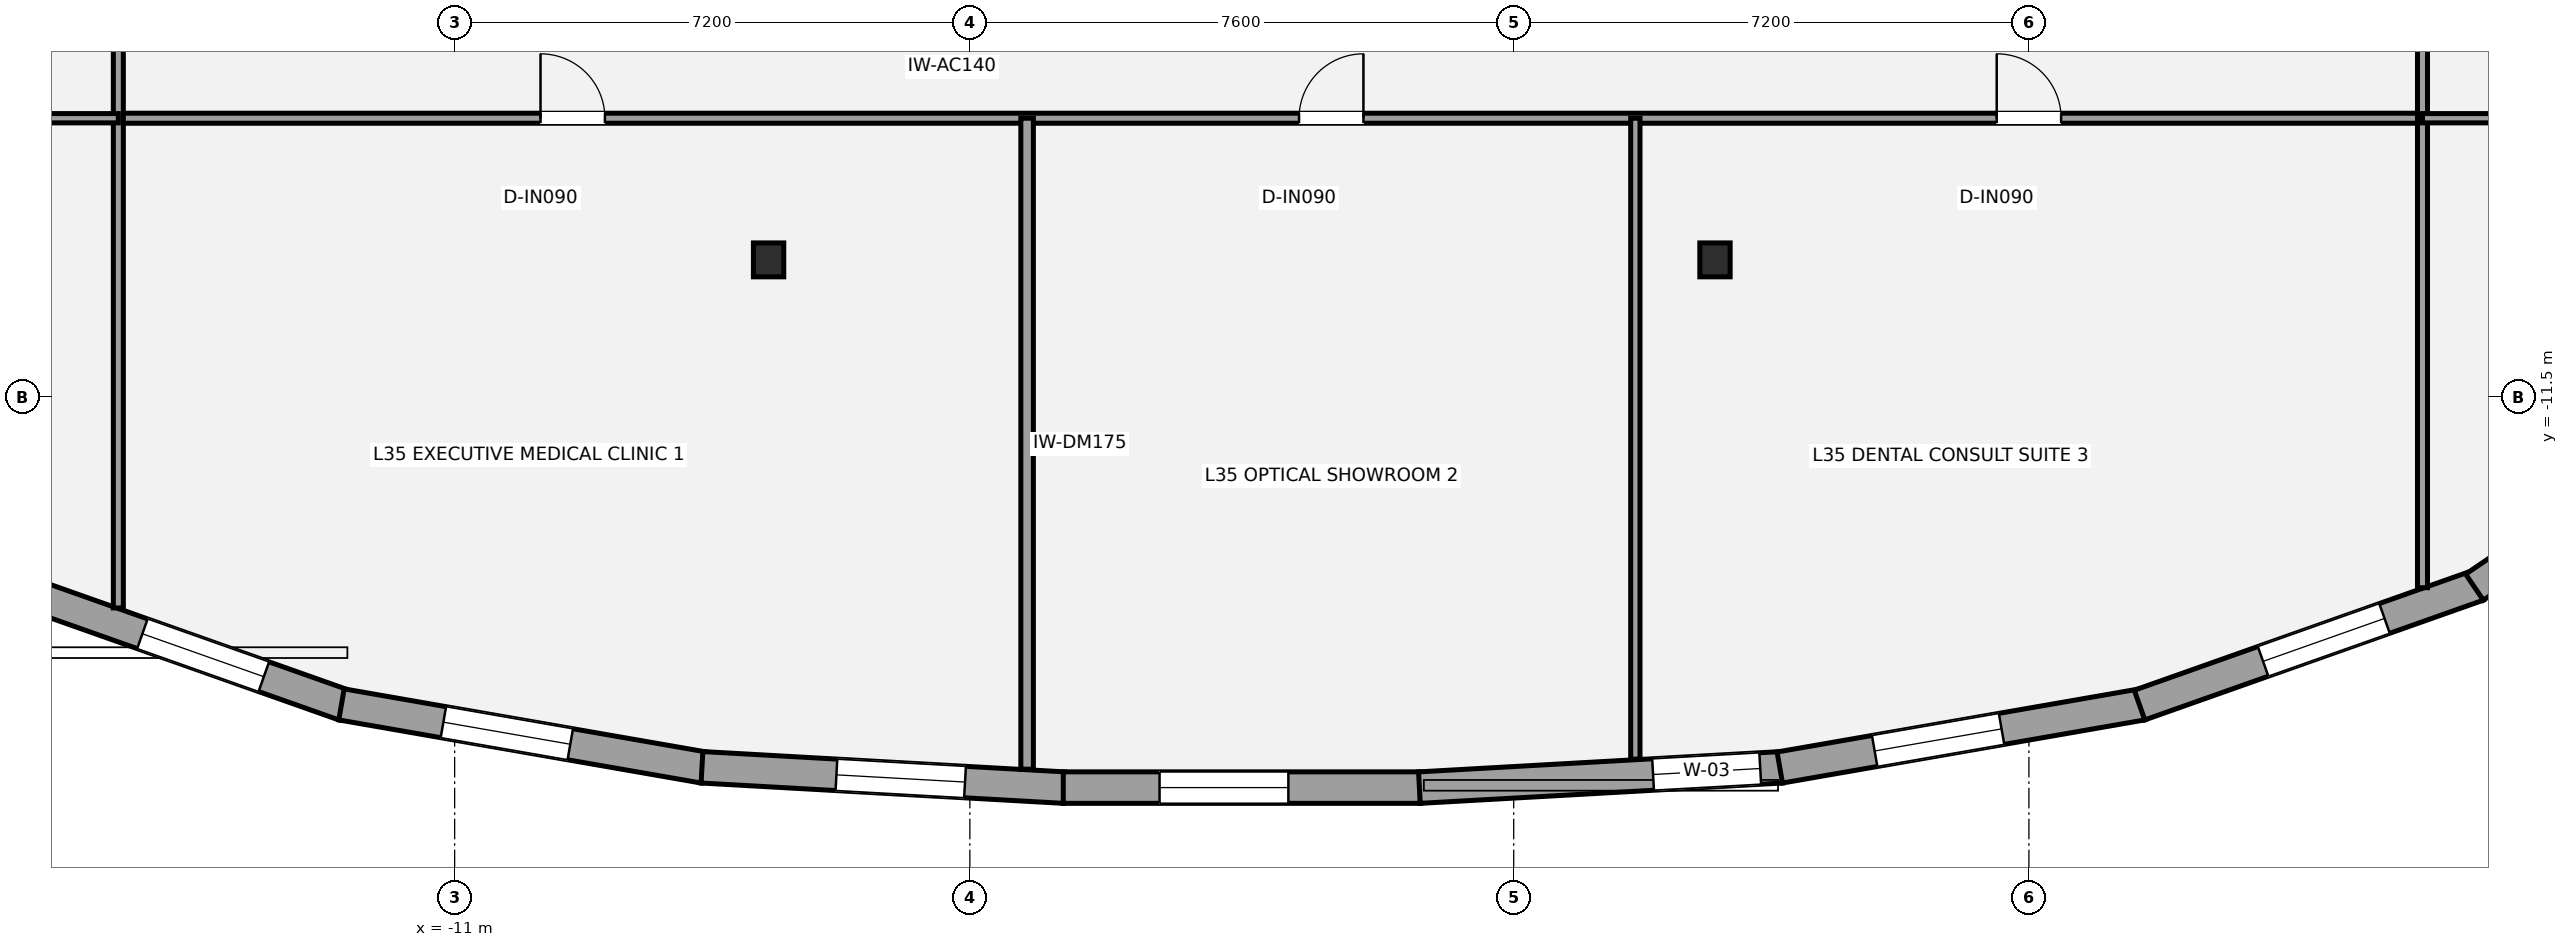
"""IFC4 building model, lengths in metres.
Left out: names, types, materials, properties, quantities, classifications, styles, units other than length and angle.
Written with IfcOpenShell. Run it as: python <this file> out.ifc"""

import sys

from ifc_helpers import new_model, si_unit, direction, frame, frame_2d, origin, origin_2d, place, context, subcontext, project, spatial, rectangle, i_section, extrude, element, fill, save


model = new_model("IFC4")
c1 = context("Model", 3, precision=1e-05, world=origin(), true_north=direction((0.0, 1.0)))
c2 = subcontext(c1, "Body", "Model", "MODEL_VIEW")
j1 = project(units=[si_unit("LENGTHUNIT", "METRE"), si_unit("PLANEANGLEUNIT", "RADIAN")], contexts=[c1])
p1 = place(None, origin())
s1 = spatial("IfcSite", under=j1, at=p1, CompositionType="ELEMENT")
p2 = place(p1, origin())
s2 = spatial("IfcBuilding", under=s1, at=p2, CompositionType="ELEMENT")
p3 = place(p2, frame((0.0, 0.0, 131.6)))
s3 = spatial("IfcBuildingStorey", under=s2, at=p3, CompositionType="ELEMENT", Elevation=131.6)
for number, where, z_axis, x_axis in (
    (1, (-6.613, -9.579, 0.0), (0.0, 0.0, 1.0), (1.0, 0.0, 0.0)),
    (2, (6.613, -9.579, 0.0), (0.0, 0.0, 1.0), (1.0, 0.0, 0.0)),
):
    element("IfcColumn", number, at=place(p3, frame(where, z_axis=z_axis, x_axis=x_axis)), inside=s3, PredefinedType="COLUMN", context=c2, shape_type="SweptSolid", body=[
        extrude(i_section(OverallWidth=0.424, OverallDepth=0.474, WebThickness=0.048, FlangeThickness=0.077, at=origin_2d()), origin(), (0.0, 0.0, 1.0), 3.5),
    ])
p4 = place(p3, frame((-12.546, -15.8, 0.0), z_axis=(0.0, 0.0, 1.0), x_axis=(-0.942780868171, 0.333413009061, 0.0)))
e3 = element("IfcWall", 3, at=p4, inside=s3, PredefinedType="STANDARD", context=c2, shape_type="SweptSolid", body=[
    extrude(rectangle(XDim=5.018, YDim=0.44, at=frame_2d((2.509, 0.0))), origin(), (0.0, 0.0, 1.0), 2.478),
])
p5 = place(p4, frame((1.189, 0.0, 0.65)))
e4 = element("IfcOpeningElement", 4, at=p5, cuts=e3, PredefinedType="OPENING", context=c2, shape_type="SweptSolid", body=[
    extrude(rectangle(XDim=1.8, YDim=1.7, at=frame_2d((0.9, 0.85))), frame((0.0, 0.23, 0.0), z_axis=(0.0, -1.0, 0.0), x_axis=(1.0, 0.0, 0.0)), (0.0, 0.0, 1.0), 0.46),
])
p6 = place(p3, frame((-7.518, -16.673, 0.0), z_axis=(0.0, 0.0, 1.0), x_axis=(-0.985177916526, 0.171535631254, 0.0)))
e5 = element("IfcWall", 5, at=p6, inside=s3, PredefinedType="STANDARD", context=c2, shape_type="SweptSolid", body=[
    extrude(rectangle(XDim=5.139, YDim=0.44, at=frame_2d((2.57, 0.0))), origin(), (0.0, 0.0, 1.0), 2.478),
])
p7 = place(p6, frame((1.894, 0.0, 0.65)))
e6 = element("IfcOpeningElement", 6, at=p7, cuts=e5, PredefinedType="OPENING", context=c2, shape_type="SweptSolid", body=[
    extrude(rectangle(XDim=1.8, YDim=1.7, at=frame_2d((0.9, 0.85))), frame((0.0, 0.23, 0.0), z_axis=(0.0, -1.0, 0.0), x_axis=(1.0, 0.0, 0.0)), (0.0, 0.0, 1.0), 0.46),
])
p8 = place(p3, frame((-2.482, -16.954, 0.0), z_axis=(0.0, 0.0, 1.0), x_axis=(-0.99842742965, 0.056059501621, 0.0)))
e7 = element("IfcWall", 7, at=p8, inside=s3, PredefinedType="STANDARD", context=c2, shape_type="SweptSolid", body=[
    extrude(rectangle(XDim=5.069, YDim=0.44, at=frame_2d((2.535, 0.0))), origin(), (0.0, 0.0, 1.0), 2.478),
])
p9 = place(p8, frame((1.387, 0.0, 0.65)))
e8 = element("IfcOpeningElement", 8, at=p9, cuts=e7, PredefinedType="OPENING", context=c2, shape_type="SweptSolid", body=[
    extrude(rectangle(XDim=1.8, YDim=1.7, at=frame_2d((0.9, 0.85))), frame((0.0, 0.23, 0.0), z_axis=(0.0, -1.0, 0.0), x_axis=(1.0, 0.0, 0.0)), (0.0, 0.0, 1.0), 0.46),
])
p10 = place(p3, frame((2.495, -16.953, 0.0), z_axis=(0.0, 0.0, 1.0), x_axis=(-1.0, 0.0, 0.0)))
e9 = element("IfcWall", 9, at=p10, inside=s3, PredefinedType="STANDARD", context=c2, shape_type="SweptSolid", body=[
    extrude(rectangle(XDim=4.989, YDim=0.44, at=frame_2d((2.495, 0.0))), origin(), (0.0, 0.0, 1.0), 2.482),
])
p11 = place(p10, frame((1.844, 0.0, 0.65)))
e10 = element("IfcOpeningElement", 10, at=p11, cuts=e9, PredefinedType="OPENING", context=c2, shape_type="SweptSolid", body=[
    extrude(rectangle(XDim=1.8, YDim=1.7, at=frame_2d((0.9, 0.85))), frame((0.0, 0.23, 0.0), z_axis=(0.0, -1.0, 0.0), x_axis=(1.0, 0.0, 0.0)), (0.0, 0.0, 1.0), 0.46),
])
p12 = place(p3, frame((7.544, -16.669, 0.0), z_axis=(0.0, 0.0, 1.0), x_axis=(-0.99842742965, -0.056059501621, 0.0)))
e11 = element("IfcWall", 11, at=p12, inside=s3, PredefinedType="STANDARD", context=c2, shape_type="SweptSolid", body=[
    extrude(rectangle(XDim=5.069, YDim=0.44, at=frame_2d((2.535, 0.0))), origin(), (0.0, 0.0, 1.0), 2.478),
])
p13 = place(p12, frame((0.299, 0.0, 0.65)))
e12 = element("IfcOpeningElement", 12, at=p13, cuts=e11, PredefinedType="OPENING", context=c2, shape_type="SweptSolid", body=[
    extrude(rectangle(XDim=1.5, YDim=1.7, at=frame_2d((0.75, 0.85))), frame((0.0, 0.23, 0.0), z_axis=(0.0, -1.0, 0.0), x_axis=(1.0, 0.0, 0.0)), (0.0, 0.0, 1.0), 0.46),
])
p14 = place(p3, frame((12.582, -15.791, 0.0), z_axis=(0.0, 0.0, 1.0), x_axis=(-0.985177916526, -0.171535631254, 0.0)))
e13 = element("IfcWall", 13, at=p14, inside=s3, PredefinedType="STANDARD", context=c2, shape_type="SweptSolid", body=[
    extrude(rectangle(XDim=5.139, YDim=0.44, at=frame_2d((2.57, 0.0))), origin(), (0.0, 0.0, 1.0), 2.478),
])
p15 = place(p14, frame((1.993, 0.0, 0.65)))
e14 = element("IfcOpeningElement", 14, at=p15, cuts=e13, PredefinedType="OPENING", context=c2, shape_type="SweptSolid", body=[
    extrude(rectangle(XDim=1.8, YDim=1.7, at=frame_2d((0.9, 0.85))), frame((0.0, 0.23, 0.0), z_axis=(0.0, -1.0, 0.0), x_axis=(1.0, 0.0, 0.0)), (0.0, 0.0, 1.0), 0.46),
])
p16 = place(p3, frame((17.277, -14.127, 0.0), z_axis=(0.0, 0.0, 1.0), x_axis=(-0.942780868171, -0.333413009061, 0.0)))
e15 = element("IfcWall", 15, at=p16, inside=s3, PredefinedType="STANDARD", context=c2, shape_type="SweptSolid", body=[
    extrude(rectangle(XDim=5.018, YDim=0.44, at=frame_2d((2.509, 0.0))), origin(), (0.0, 0.0, 1.0), 2.478),
])
p17 = place(p16, frame((1.387, 0.0, 0.65)))
e16 = element("IfcOpeningElement", 16, at=p17, cuts=e15, PredefinedType="OPENING", context=c2, shape_type="SweptSolid", body=[
    extrude(rectangle(XDim=1.8, YDim=1.7, at=frame_2d((0.9, 0.85))), frame((0.0, 0.23, 0.0), z_axis=(0.0, -1.0, 0.0), x_axis=(1.0, 0.0, 0.0)), (0.0, 0.0, 1.0), 0.46),
])
p18 = place(p3, frame((21.018, -11.582, 0.0), z_axis=(0.0, 0.0, 1.0), x_axis=(-0.827670311179, -0.561214625605, 0.0)))
e17 = element("IfcWall", 17, at=p18, inside=s3, PredefinedType="STANDARD", context=c2, shape_type="SweptSolid", body=[
    extrude(rectangle(XDim=4.58, YDim=0.44, at=frame_2d((2.29, 0.0))), origin(), (0.0, 0.0, 1.0), 2.482),
])
p19 = place(p18, frame((1.886, 0.0, 0.65)))
e18 = element("IfcOpeningElement", 18, at=p19, cuts=e17, PredefinedType="OPENING", context=c2, shape_type="SweptSolid", body=[
    extrude(rectangle(XDim=1.8, YDim=1.7, at=frame_2d((0.9, 0.85))), frame((0.0, 0.23, 0.0), z_axis=(0.0, -1.0, 0.0), x_axis=(1.0, 0.0, 0.0)), (0.0, 0.0, 1.0), 0.46),
])
p20 = place(p3, frame((-15.7, -7.6, 0.0), z_axis=(0.0, 0.0, 1.0), x_axis=(1.0, 0.0, 0.0)))
e19 = element("IfcWall", 19, at=p20, inside=s3, PredefinedType="PARTITIONING", context=c2, shape_type="SweptSolid", body=[
    extrude(rectangle(XDim=32.2, YDim=0.14, at=frame_2d((16.1, 0.0))), origin(), (0.0, 0.0, 1.0), 2.638),
])
p21 = place(p20, frame((5.9, 0.0, 0.0)))
e20 = element("IfcOpeningElement", 20, at=p21, cuts=e19, PredefinedType="OPENING", context=c2, shape_type="SweptSolid", body=[
    extrude(rectangle(XDim=0.9, YDim=2.1, at=frame_2d((0.45, 1.05))), frame((0.0, 0.08, 0.0), z_axis=(0.0, -1.0, 0.0), x_axis=(1.0, 0.0, 0.0)), (0.0, 0.0, 1.0), 0.16),
])
p22 = place(p20, frame((16.5, 0.0, 0.0)))
e21 = element("IfcOpeningElement", 21, at=p22, cuts=e19, PredefinedType="OPENING", context=c2, shape_type="SweptSolid", body=[
    extrude(rectangle(XDim=0.9, YDim=2.1, at=frame_2d((0.45, 1.05))), frame((0.0, 0.08, 0.0), z_axis=(0.0, -1.0, 0.0), x_axis=(1.0, 0.0, 0.0)), (0.0, 0.0, 1.0), 0.16),
])
p23 = place(p20, frame((26.25, 0.0, 0.0)))
e22 = element("IfcOpeningElement", 22, at=p23, cuts=e19, PredefinedType="OPENING", context=c2, shape_type="SweptSolid", body=[
    extrude(rectangle(XDim=0.9, YDim=2.1, at=frame_2d((0.45, 1.05))), frame((0.0, 0.08, 0.0), z_axis=(0.0, -1.0, 0.0), x_axis=(1.0, 0.0, 0.0)), (0.0, 0.0, 1.0), 0.16),
])
p24 = place(p3, frame((-15.7, -14.443, 0.0), z_axis=(0.0, 0.0, 1.0), x_axis=(0.0, 1.0, 0.0)))
e23 = element("IfcWall", 23, at=p24, inside=s3, PredefinedType="PARTITIONING", context=c2, shape_type="SweptSolid", body=[
    extrude(rectangle(XDim=21.993, YDim=0.14, at=frame_2d((10.997, 0.0))), origin(), (0.0, 0.0, 1.0), 2.713),
])
p25 = place(p24, frame((9.293, 0.0, 0.0)))
e24 = element("IfcOpeningElement", 24, at=p25, cuts=e23, PredefinedType="OPENING", context=c2, shape_type="SweptSolid", body=[
    extrude(rectangle(XDim=0.9, YDim=2.1, at=frame_2d((0.45, 1.05))), frame((0.0, 0.08, 0.0), z_axis=(0.0, -1.0, 0.0), x_axis=(1.0, 0.0, 0.0)), (0.0, 0.0, 1.0), 0.16),
])
p26 = place(p24, frame((14.393, 0.0, 0.0)))
e25 = element("IfcOpeningElement", 25, at=p26, cuts=e23, PredefinedType="OPENING", context=c2, shape_type="SweptSolid", body=[
    extrude(rectangle(XDim=0.9, YDim=2.1, at=frame_2d((0.45, 1.05))), frame((0.0, 0.08, 0.0), z_axis=(0.0, -1.0, 0.0), x_axis=(1.0, 0.0, 0.0)), (0.0, 0.0, 1.0), 0.16),
])
p27 = place(p24, frame((19.068, 0.0, 0.0)))
e26 = element("IfcOpeningElement", 26, at=p27, cuts=e23, PredefinedType="OPENING", context=c2, shape_type="SweptSolid", body=[
    extrude(rectangle(XDim=0.9, YDim=2.1, at=frame_2d((0.45, 1.05))), frame((0.0, 0.08, 0.0), z_axis=(0.0, -1.0, 0.0), x_axis=(1.0, 0.0, 0.0)), (0.0, 0.0, 1.0), 0.16),
])
p28 = place(p3, frame((16.5, -14.16, 0.0), z_axis=(0.0, 0.0, 1.0), x_axis=(0.0, 1.0, 0.0)))
e27 = element("IfcWall", 27, at=p28, inside=s3, PredefinedType="PARTITIONING", context=c2, shape_type="SweptSolid", body=[
    extrude(rectangle(XDim=21.71, YDim=0.14, at=frame_2d((10.855, 0.0))), origin(), (0.0, 0.0, 1.0), 2.713),
])
p29 = place(p28, frame((9.41, 0.0, 0.0)))
e28 = element("IfcOpeningElement", 28, at=p29, cuts=e27, PredefinedType="OPENING", context=c2, shape_type="SweptSolid", body=[
    extrude(rectangle(XDim=0.9, YDim=2.1, at=frame_2d((0.45, 1.05))), frame((0.0, 0.08, 0.0), z_axis=(0.0, -1.0, 0.0), x_axis=(1.0, 0.0, 0.0)), (0.0, 0.0, 1.0), 0.16),
])
p30 = place(p28, frame((15.01, 0.0, 0.0)))
e29 = element("IfcOpeningElement", 29, at=p30, cuts=e27, PredefinedType="OPENING", context=c2, shape_type="SweptSolid", body=[
    extrude(rectangle(XDim=0.9, YDim=2.1, at=frame_2d((0.45, 1.05))), frame((0.0, 0.08, 0.0), z_axis=(0.0, -1.0, 0.0), x_axis=(1.0, 0.0, 0.0)), (0.0, 0.0, 1.0), 0.16),
])
p31 = place(p28, frame((19.285, 0.0, 0.0)))
e30 = element("IfcOpeningElement", 30, at=p31, cuts=e27, PredefinedType="OPENING", context=c2, shape_type="SweptSolid", body=[
    extrude(rectangle(XDim=0.9, YDim=2.1, at=frame_2d((0.45, 1.05))), frame((0.0, 0.08, 0.0), z_axis=(0.0, -1.0, 0.0), x_axis=(1.0, 0.0, 0.0)), (0.0, 0.0, 1.0), 0.16),
])
p32 = place(p3, frame((-3.0, -16.696, 0.0), z_axis=(0.0, 0.0, 1.0), x_axis=(0.0, 1.0, 0.0)))
e31 = element("IfcWall", 31, at=p32, inside=s3, PredefinedType="PARTITIONING", context=c2, shape_type="SweptSolid", body=[
    extrude(rectangle(XDim=9.096, YDim=0.175, at=frame_2d((4.548, 0.0))), origin(), (0.0, 0.0, 1.0), 2.713),
])
p33 = place(p3, frame((5.5, -16.556, 0.0), z_axis=(0.0, 0.0, 1.0), x_axis=(0.0, 1.0, 0.0)))
e32 = element("IfcWall", 32, at=p33, inside=s3, PredefinedType="PARTITIONING", context=c2, shape_type="SweptSolid", body=[
    extrude(rectangle(XDim=8.956, YDim=0.13, at=frame_2d((4.478, 0.0))), origin(), (0.0, 0.0, 1.0), 3.26),
])
p34 = place(p3, frame((-23.492, -7.6, 0.0), z_axis=(0.0, 0.0, 1.0), x_axis=(1.0, 0.0, 0.0)))
e33 = element("IfcWall", 33, at=p34, inside=s3, PredefinedType="PARTITIONING", context=c2, shape_type="SweptSolid", body=[
    extrude(rectangle(XDim=7.792, YDim=0.13, at=frame_2d((3.896, 0.0))), origin(), (0.0, 0.0, 1.0), 2.713),
])
p35 = place(p34, frame((1.71, 0.0, 0.0)))
e34 = element("IfcOpeningElement", 34, at=p35, cuts=e33, PredefinedType="OPENING", context=c2, shape_type="SweptSolid", body=[
    extrude(rectangle(XDim=0.9, YDim=2.1, at=frame_2d((0.45, 1.05))), frame((0.0, 0.075, 0.0), z_axis=(0.0, -1.0, 0.0), x_axis=(1.0, 0.0, 0.0)), (0.0, 0.0, 1.0), 0.15),
])
p36 = place(p3, frame((16.5, -7.6, 0.0), z_axis=(0.0, 0.0, 1.0), x_axis=(1.0, 0.0, 0.0)))
e35 = element("IfcWall", 35, at=p36, inside=s3, PredefinedType="PARTITIONING", context=c2, shape_type="SweptSolid", body=[
    extrude(rectangle(XDim=6.992, YDim=0.13, at=frame_2d((3.496, 0.0))), origin(), (0.0, 0.0, 1.0), 2.713),
])
p37 = place(p36, frame((1.37, 0.0, 0.0)))
e36 = element("IfcOpeningElement", 36, at=p37, cuts=e35, PredefinedType="OPENING", context=c2, shape_type="SweptSolid", body=[
    extrude(rectangle(XDim=0.9, YDim=2.1, at=frame_2d((0.45, 1.05))), frame((0.0, 0.075, 0.0), z_axis=(0.0, -1.0, 0.0), x_axis=(1.0, 0.0, 0.0)), (0.0, 0.0, 1.0), 0.15),
])
p38 = place(p5, origin())
e37 = element("IfcWindow", 37, at=p38, inside=s3, PartitioningType="SINGLE_PANEL", PredefinedType="WINDOW", context=c2, shape_type="SweptSolid", body=[
    extrude(rectangle(XDim=1.8, YDim=1.7, at=frame_2d((0.9, 0.85))), frame((0.0, -0.01, 0.0), z_axis=(0.0, -1.0, 0.0), x_axis=(1.0, 0.0, 0.0)), (0.0, 0.0, 1.0), 0.06),
])
fill(e4, e37)
p39 = place(p7, origin())
e38 = element("IfcWindow", 38, at=p39, inside=s3, PartitioningType="SINGLE_PANEL", PredefinedType="WINDOW", context=c2, shape_type="SweptSolid", body=[
    extrude(rectangle(XDim=1.8, YDim=1.7, at=frame_2d((0.9, 0.85))), frame((0.0, -0.01, 0.0), z_axis=(0.0, -1.0, 0.0), x_axis=(1.0, 0.0, 0.0)), (0.0, 0.0, 1.0), 0.06),
])
fill(e6, e38)
p40 = place(p9, origin())
e39 = element("IfcWindow", 39, at=p40, inside=s3, PartitioningType="SINGLE_PANEL", PredefinedType="WINDOW", context=c2, shape_type="SweptSolid", body=[
    extrude(rectangle(XDim=1.8, YDim=1.7, at=frame_2d((0.9, 0.85))), frame((0.0, -0.01, 0.0), z_axis=(0.0, -1.0, 0.0), x_axis=(1.0, 0.0, 0.0)), (0.0, 0.0, 1.0), 0.06),
])
fill(e8, e39)
p41 = place(p11, origin())
e40 = element("IfcWindow", 40, at=p41, inside=s3, PartitioningType="SINGLE_PANEL", PredefinedType="WINDOW", context=c2, shape_type="SweptSolid", body=[
    extrude(rectangle(XDim=1.8, YDim=1.7, at=frame_2d((0.9, 0.85))), frame((0.0, -0.01, 0.0), z_axis=(0.0, -1.0, 0.0), x_axis=(1.0, 0.0, 0.0)), (0.0, 0.0, 1.0), 0.06),
])
fill(e10, e40)
p42 = place(p13, origin())
e41 = element("IfcWindow", 41, at=p42, inside=s3, PartitioningType="SINGLE_PANEL", PredefinedType="WINDOW", context=c2, shape_type="SweptSolid", body=[
    extrude(rectangle(XDim=1.5, YDim=1.7, at=frame_2d((0.75, 0.85))), frame((0.0, -0.01, 0.0), z_axis=(0.0, -1.0, 0.0), x_axis=(1.0, 0.0, 0.0)), (0.0, 0.0, 1.0), 0.06),
])
fill(e12, e41)
p43 = place(p15, origin())
e42 = element("IfcWindow", 42, at=p43, inside=s3, PartitioningType="SINGLE_PANEL", PredefinedType="WINDOW", context=c2, shape_type="SweptSolid", body=[
    extrude(rectangle(XDim=1.8, YDim=1.7, at=frame_2d((0.9, 0.85))), frame((0.0, -0.01, 0.0), z_axis=(0.0, -1.0, 0.0), x_axis=(1.0, 0.0, 0.0)), (0.0, 0.0, 1.0), 0.06),
])
fill(e14, e42)
p44 = place(p17, origin())
e43 = element("IfcWindow", 43, at=p44, inside=s3, PartitioningType="SINGLE_PANEL", PredefinedType="WINDOW", context=c2, shape_type="SweptSolid", body=[
    extrude(rectangle(XDim=1.8, YDim=1.7, at=frame_2d((0.9, 0.85))), frame((0.0, -0.01, 0.0), z_axis=(0.0, -1.0, 0.0), x_axis=(1.0, 0.0, 0.0)), (0.0, 0.0, 1.0), 0.06),
])
fill(e16, e43)
p45 = place(p21, origin())
e44 = element("IfcDoor", 44, at=p45, inside=s3, OperationType="SINGLE_SWING_LEFT", PredefinedType="DOOR", context=c2, shape_type="SweptSolid", body=[
    extrude(rectangle(XDim=0.9, YDim=2.1, at=frame_2d((0.45, 1.05))), frame((0.0, 0.025, 0.0), z_axis=(0.0, -1.0, 0.0), x_axis=(1.0, 0.0, 0.0)), (0.0, 0.0, 1.0), 0.05),
])
fill(e20, e44)
p46 = place(p22, origin())
e45 = element("IfcDoor", 45, at=p46, inside=s3, OperationType="SINGLE_SWING_RIGHT", PredefinedType="DOOR", context=c2, shape_type="SweptSolid", body=[
    extrude(rectangle(XDim=0.9, YDim=2.1, at=frame_2d((0.45, 1.05))), frame((0.0, 0.025, 0.0), z_axis=(0.0, -1.0, 0.0), x_axis=(1.0, 0.0, 0.0)), (0.0, 0.0, 1.0), 0.05),
])
fill(e21, e45)
p47 = place(p23, origin())
e46 = element("IfcDoor", 46, at=p47, inside=s3, OperationType="SINGLE_SWING_LEFT", PredefinedType="DOOR", context=c2, shape_type="SweptSolid", body=[
    extrude(rectangle(XDim=0.9, YDim=2.1, at=frame_2d((0.45, 1.05))), frame((0.0, 0.025, 0.0), z_axis=(0.0, -1.0, 0.0), x_axis=(1.0, 0.0, 0.0)), (0.0, 0.0, 1.0), 0.05),
])
fill(e22, e46)
save(model, sys.argv[1])
